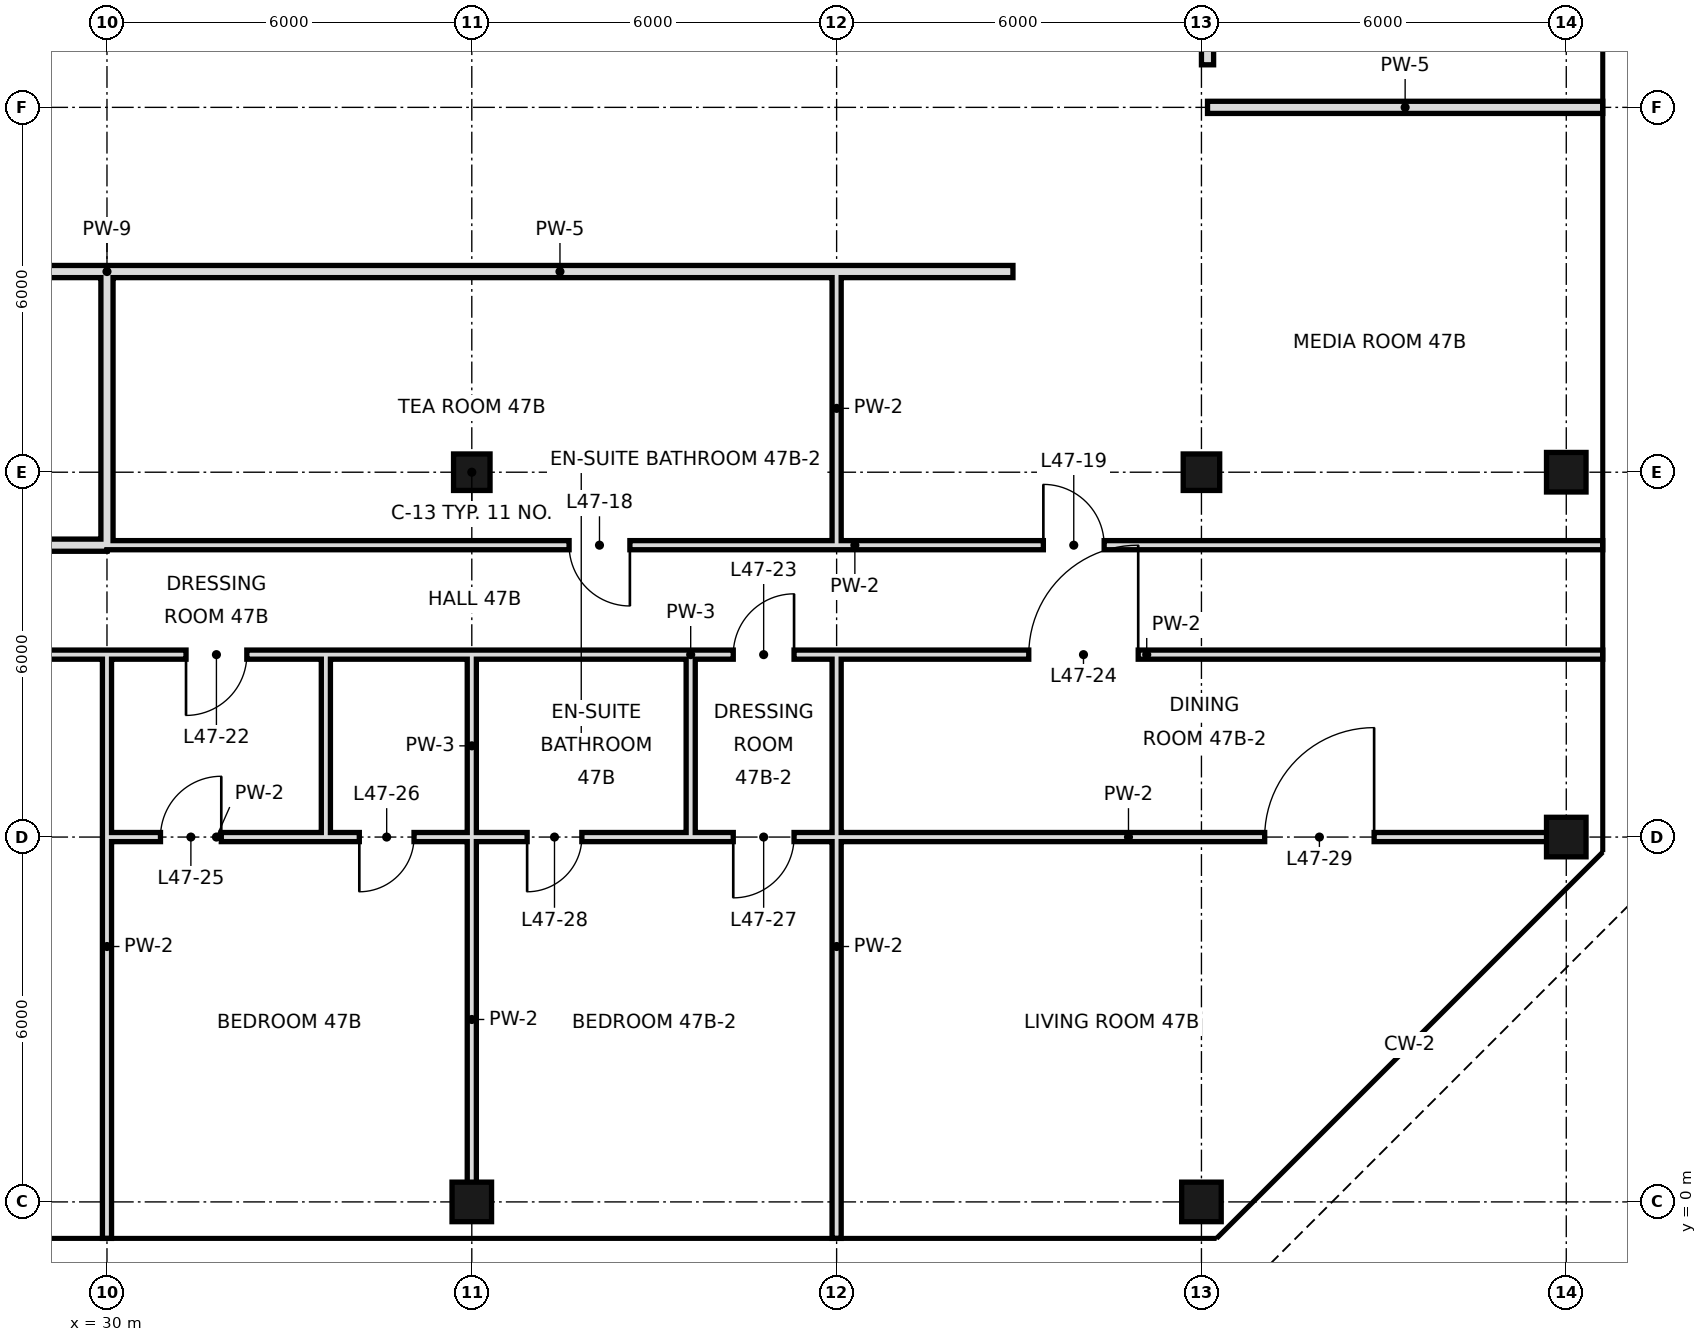
"""IFC4 building model, lengths in metres.
Left out: names, types, materials, properties, quantities, classifications, styles, units other than length and angle.
Written with IfcOpenShell. Run it as: python <this file> out.ifc"""

import sys

from ifc_helpers import new_model, si_unit, direction, frame, frame_2d, origin, origin_2d, place, context, subcontext, project, spatial, rectangle, hollow_rectangle, extrude, element, fill, save


model = new_model("IFC4")
c1 = context("Model", 3, precision=1e-05, world=origin(), true_north=direction((0.0, 1.0)))
c2 = subcontext(c1, "Body", "Model", "MODEL_VIEW")
j1 = project(units=[si_unit("LENGTHUNIT", "METRE"), si_unit("PLANEANGLEUNIT", "RADIAN")], contexts=[c1])
p1 = place(None, origin())
s1 = spatial("IfcSite", under=j1, at=p1, CompositionType="ELEMENT")
p2 = place(p1, origin())
s2 = spatial("IfcBuilding", under=s1, at=p2, CompositionType="ELEMENT")
p3 = place(p2, frame((0.0, 0.0, 202.8)))
s3 = spatial("IfcBuildingStorey", under=s2, at=p3, CompositionType="ELEMENT", Elevation=202.8)
p4 = place(p3, frame((36.0, 0.0, 0.0), z_axis=(0.0, 0.0, 1.0), x_axis=(1.0, 0.0, 0.0)))
e1 = element("IfcColumn", 1, at=p4, inside=s3, PredefinedType="COLUMN", context=c2, shape_type="SweptSolid", body=[
    extrude(hollow_rectangle(XDim=0.65, YDim=0.65, WallThickness=0.032, at=origin_2d()), origin(), (0.0, 0.0, 1.0), 3.6),
])
p5 = place(p3, frame((36.0, 12.0, 0.0), z_axis=(0.0, 0.0, 1.0), x_axis=(1.0, 0.0, 0.0)))
e2 = element("IfcColumn", 2, at=p5, inside=s3, PredefinedType="COLUMN", context=c2, shape_type="SweptSolid", body=[
    extrude(hollow_rectangle(XDim=0.6, YDim=0.6, WallThickness=0.028, at=origin_2d()), origin(), (0.0, 0.0, 1.0), 3.6),
])
p6 = place(p3, frame((48.0, 0.0, 0.0), z_axis=(0.0, 0.0, 1.0), x_axis=(1.0, 0.0, 0.0)))
e3 = element("IfcColumn", 3, at=p6, inside=s3, PredefinedType="COLUMN", context=c2, shape_type="SweptSolid", body=[
    extrude(hollow_rectangle(XDim=0.65, YDim=0.65, WallThickness=0.032, at=origin_2d()), origin(), (0.0, 0.0, 1.0), 3.6),
])
p7 = place(p3, frame((48.0, 12.0, 0.0), z_axis=(0.0, 0.0, 1.0), x_axis=(1.0, 0.0, 0.0)))
e4 = element("IfcColumn", 4, at=p7, inside=s3, PredefinedType="COLUMN", context=c2, shape_type="SweptSolid", body=[
    extrude(hollow_rectangle(XDim=0.6, YDim=0.6, WallThickness=0.028, at=origin_2d()), origin(), (0.0, 0.0, 1.0), 3.6),
])
for number, where, z_axis, x_axis in (
    (5, (54.0, 6.0, 0.0), (0.0, 0.0, 1.0), (1.0, 0.0, 0.0)),
    (6, (54.0, 12.0, 0.0), (0.0, 0.0, 1.0), (1.0, 0.0, 0.0)),
):
    element("IfcColumn", number, at=place(p3, frame(where, z_axis=z_axis, x_axis=x_axis)), inside=s3, PredefinedType="COLUMN", context=c2, shape_type="SweptSolid", body=[
        extrude(hollow_rectangle(XDim=0.65, YDim=0.65, WallThickness=0.032, at=origin_2d()), origin(), (0.0, 0.0, 1.0), 3.6),
    ])
p8 = place(p3, frame((30.0, 10.8, 0.0), z_axis=(0.0, 0.0, 1.0), x_axis=(0.0, 1.0, 0.0)))
e7 = element("IfcWall", 7, at=p8, inside=s3, PredefinedType="SOLIDWALL", context=c2, shape_type="SweptSolid", body=[
    extrude(rectangle(XDim=4.5, YDim=0.2, at=frame_2d((2.25, 0.0))), origin(), (0.0, 0.0, 1.0), 2.72),
])
p9 = place(p3, frame((30.0, -0.6, 0.0), z_axis=(0.0, 0.0, 1.0), x_axis=(0.0, 1.0, 0.0)))
e8 = element("IfcWall", 8, at=p9, inside=s3, PredefinedType="PARTITIONING", context=c2, shape_type="SweptSolid", body=[
    extrude(rectangle(XDim=9.6, YDim=0.15, at=frame_2d((4.8, 0.0))), origin(), (0.0, 0.0, 1.0), 2.72),
])
p10 = place(p3, frame((33.6, 6.0, 0.0), z_axis=(0.0, 0.0, 1.0), x_axis=(0.0, 1.0, 0.0)))
e9 = element("IfcWall", 9, at=p10, inside=s3, PredefinedType="PARTITIONING", context=c2, shape_type="SweptSolid", body=[
    extrude(rectangle(XDim=3.0, YDim=0.15, at=frame_2d((1.5, 0.0))), origin(), (0.0, 0.0, 1.0), 3.42),
])
p11 = place(p3, frame((36.0, 0.0, 0.0), z_axis=(0.0, 0.0, 1.0), x_axis=(0.0, 1.0, 0.0)))
e10 = element("IfcWall", 10, at=p11, inside=s3, PredefinedType="PARTITIONING", context=c2, shape_type="SweptSolid", body=[
    extrude(rectangle(XDim=6.0, YDim=0.15, at=frame_2d((3.0, 0.0))), origin(), (0.0, 0.0, 1.0), 2.72),
])
p12 = place(p3, frame((36.0, 6.0, 0.0), z_axis=(0.0, 0.0, 1.0), x_axis=(0.0, 1.0, 0.0)))
e11 = element("IfcWall", 11, at=p12, inside=s3, PredefinedType="PARTITIONING", context=c2, shape_type="SweptSolid", body=[
    extrude(rectangle(XDim=3.0, YDim=0.15, at=frame_2d((1.5, 0.0))), origin(), (0.0, 0.0, 1.0), 2.72),
])
p13 = place(p3, frame((39.6, 6.0, 0.0), z_axis=(0.0, 0.0, 1.0), x_axis=(0.0, 1.0, 0.0)))
e12 = element("IfcWall", 12, at=p13, inside=s3, PredefinedType="PARTITIONING", context=c2, shape_type="SweptSolid", body=[
    extrude(rectangle(XDim=3.0, YDim=0.15, at=frame_2d((1.5, 0.0))), origin(), (0.0, 0.0, 1.0), 3.42),
])
p14 = place(p3, frame((42.0, -0.6, 0.0), z_axis=(0.0, 0.0, 1.0), x_axis=(0.0, 1.0, 0.0)))
e13 = element("IfcWall", 13, at=p14, inside=s3, PredefinedType="PARTITIONING", context=c2, shape_type="SweptSolid", body=[
    extrude(rectangle(XDim=9.6, YDim=0.15, at=frame_2d((4.8, 0.0))), origin(), (0.0, 0.0, 1.0), 2.72),
])
p15 = place(p3, frame((42.0, 10.8, 0.0), z_axis=(0.0, 0.0, 1.0), x_axis=(0.0, 1.0, 0.0)))
e14 = element("IfcWall", 14, at=p15, inside=s3, PredefinedType="PARTITIONING", context=c2, shape_type="SweptSolid", body=[
    extrude(rectangle(XDim=4.5, YDim=0.15, at=frame_2d((2.25, 0.0))), origin(), (0.0, 0.0, 1.0), 2.72),
])
p16 = place(p3, frame((48.1, 18.7, 0.0), z_axis=(0.0, 0.0, 1.0), x_axis=(0.0, 1.0, 0.0)))
e15 = element("IfcWall", 15, at=p16, inside=s3, PredefinedType="SOLIDWALL", context=c2, shape_type="SweptSolid", body=[
    extrude(rectangle(XDim=29.2, YDim=0.2, at=frame_2d((14.6, 0.0))), origin(), (0.0, 0.0, 1.0), 2.72),
])
p17 = place(p16, frame((14.0, 0.0, 0.0)))
e16 = element("IfcOpeningElement", 16, at=p17, cuts=e15, PredefinedType="OPENING", context=c2, shape_type="SweptSolid", body=[
    extrude(rectangle(XDim=1.2, YDim=2.4, at=frame_2d((0.6, 1.2))), frame((0.0, 0.11, 0.0), z_axis=(0.0, -1.0, 0.0), x_axis=(1.0, 0.0, 0.0)), (0.0, 0.0, 1.0), 0.22),
])
p18 = place(p3, frame((24.0, 10.8, 0.0), z_axis=(0.0, 0.0, 1.0), x_axis=(1.0, 0.0, 0.0)))
e17 = element("IfcWall", 17, at=p18, inside=s3, PredefinedType="SOLIDWALL", context=c2, shape_type="SweptSolid", body=[
    extrude(rectangle(XDim=6.0, YDim=0.2, at=frame_2d((3.0, 0.0))), origin(), (0.0, 0.0, 1.0), 2.72),
])
p19 = place(p18, frame((1.6, 0.0, 0.0)))
e18 = element("IfcOpeningElement", 18, at=p19, cuts=e17, PredefinedType="OPENING", context=c2, shape_type="SweptSolid", body=[
    extrude(rectangle(XDim=1.0, YDim=2.4, at=frame_2d((0.5, 1.2))), frame((0.0, 0.11, 0.0), z_axis=(0.0, -1.0, 0.0), x_axis=(1.0, 0.0, 0.0)), (0.0, 0.0, 1.0), 0.22),
])
p20 = place(p3, frame((30.0, 10.8, 0.0), z_axis=(0.0, 0.0, 1.0), x_axis=(1.0, 0.0, 0.0)))
e19 = element("IfcWall", 19, at=p20, inside=s3, PredefinedType="PARTITIONING", context=c2, shape_type="SweptSolid", body=[
    extrude(rectangle(XDim=24.6, YDim=0.15, at=frame_2d((12.3, 0.0))), origin(), (0.0, 0.0, 1.0), 3.42),
])
p21 = place(p20, frame((7.6, 0.0, 0.0)))
e20 = element("IfcOpeningElement", 20, at=p21, cuts=e19, PredefinedType="OPENING", context=c2, shape_type="SweptSolid", body=[
    extrude(rectangle(XDim=1.0, YDim=2.4, at=frame_2d((0.5, 1.2))), frame((0.0, 0.085, 0.0), z_axis=(0.0, -1.0, 0.0), x_axis=(1.0, 0.0, 0.0)), (0.0, 0.0, 1.0), 0.17),
])
p22 = place(p20, frame((15.4, 0.0, 0.0)))
e21 = element("IfcOpeningElement", 21, at=p22, cuts=e19, PredefinedType="OPENING", context=c2, shape_type="SweptSolid", body=[
    extrude(rectangle(XDim=1.0, YDim=2.4, at=frame_2d((0.5, 1.2))), frame((0.0, 0.085, 0.0), z_axis=(0.0, -1.0, 0.0), x_axis=(1.0, 0.0, 0.0)), (0.0, 0.0, 1.0), 0.17),
])
p23 = place(p3, frame((30.0, 15.3, 0.0), z_axis=(0.0, 0.0, 1.0), x_axis=(1.0, 0.0, 0.0)))
e22 = element("IfcWall", 22, at=p23, inside=s3, PredefinedType="SOLIDWALL", context=c2, shape_type="SweptSolid", body=[
    extrude(rectangle(XDim=14.9, YDim=0.2, at=frame_2d((7.45, 0.0))), origin(), (0.0, 0.0, 1.0), 2.72),
])
p24 = place(p3, frame((24.0, 15.3, 0.0), z_axis=(0.0, 0.0, 1.0), x_axis=(1.0, 0.0, 0.0)))
e23 = element("IfcWall", 23, at=p24, inside=s3, PredefinedType="SOLIDWALL", context=c2, shape_type="SweptSolid", body=[
    extrude(rectangle(XDim=6.0, YDim=0.2, at=frame_2d((3.0, 0.0))), origin(), (0.0, 0.0, 1.0), 2.72),
])
p25 = place(p3, frame((48.1, 18.0, 0.0), z_axis=(0.0, 0.0, 1.0), x_axis=(1.0, 0.0, 0.0)))
e24 = element("IfcWall", 24, at=p25, inside=s3, PredefinedType="SOLIDWALL", context=c2, shape_type="SweptSolid", body=[
    extrude(rectangle(XDim=6.5, YDim=0.2, at=frame_2d((3.25, 0.0))), origin(), (0.0, 0.0, 1.0), 2.72),
])
p26 = place(p3, frame((30.0, 6.0, 0.0), z_axis=(0.0, 0.0, 1.0), x_axis=(1.0, 0.0, 0.0)))
e25 = element("IfcWall", 25, at=p26, inside=s3, PredefinedType="PARTITIONING", context=c2, shape_type="SweptSolid", body=[
    extrude(rectangle(XDim=3.6, YDim=0.15, at=frame_2d((1.8, 0.0))), origin(), (0.0, 0.0, 1.0), 2.97),
])
p27 = place(p26, frame((0.88, 0.0, 0.0)))
e26 = element("IfcOpeningElement", 26, at=p27, cuts=e25, PredefinedType="OPENING", context=c2, shape_type="SweptSolid", body=[
    extrude(rectangle(XDim=1.0, YDim=2.4, at=frame_2d((0.5, 1.2))), frame((0.0, 0.085, 0.0), z_axis=(0.0, -1.0, 0.0), x_axis=(1.0, 0.0, 0.0)), (0.0, 0.0, 1.0), 0.17),
])
p28 = place(p3, frame((39.6, 6.0, 0.0), z_axis=(0.0, 0.0, 1.0), x_axis=(1.0, 0.0, 0.0)))
e27 = element("IfcWall", 27, at=p28, inside=s3, PredefinedType="PARTITIONING", context=c2, shape_type="SweptSolid", body=[
    extrude(rectangle(XDim=14.4, YDim=0.15, at=frame_2d((7.2, 0.0))), origin(), (0.0, 0.0, 1.0), 2.97),
])
p29 = place(p28, frame((0.7, 0.0, 0.0)))
e28 = element("IfcOpeningElement", 28, at=p29, cuts=e27, PredefinedType="OPENING", context=c2, shape_type="SweptSolid", body=[
    extrude(rectangle(XDim=1.0, YDim=2.4, at=frame_2d((0.5, 1.2))), frame((0.0, 0.085, 0.0), z_axis=(0.0, -1.0, 0.0), x_axis=(1.0, 0.0, 0.0)), (0.0, 0.0, 1.0), 0.17),
])
p30 = place(p28, frame((9.44, 0.0, 0.0)))
e29 = element("IfcOpeningElement", 29, at=p30, cuts=e27, PredefinedType="OPENING", context=c2, shape_type="SweptSolid", body=[
    extrude(rectangle(XDim=1.8, YDim=2.4, at=frame_2d((0.9, 1.2))), frame((0.0, 0.085, 0.0), z_axis=(0.0, -1.0, 0.0), x_axis=(1.0, 0.0, 0.0)), (0.0, 0.0, 1.0), 0.17),
])
p31 = place(p3, frame((33.6, 6.0, 0.0), z_axis=(0.0, 0.0, 1.0), x_axis=(1.0, 0.0, 0.0)))
e30 = element("IfcWall", 30, at=p31, inside=s3, PredefinedType="PARTITIONING", context=c2, shape_type="SweptSolid", body=[
    extrude(rectangle(XDim=6.0, YDim=0.15, at=frame_2d((3.0, 0.0))), origin(), (0.0, 0.0, 1.0), 2.97),
])
p32 = place(p31, frame((0.55, 0.0, 0.0)))
e31 = element("IfcOpeningElement", 31, at=p32, cuts=e30, PredefinedType="OPENING", context=c2, shape_type="SweptSolid", body=[
    extrude(rectangle(XDim=0.9, YDim=2.4, at=frame_2d((0.45, 1.2))), frame((0.0, 0.085, 0.0), z_axis=(0.0, -1.0, 0.0), x_axis=(1.0, 0.0, 0.0)), (0.0, 0.0, 1.0), 0.17),
])
p33 = place(p31, frame((3.31, 0.0, 0.0)))
e32 = element("IfcOpeningElement", 32, at=p33, cuts=e30, PredefinedType="OPENING", context=c2, shape_type="SweptSolid", body=[
    extrude(rectangle(XDim=0.9, YDim=2.4, at=frame_2d((0.45, 1.2))), frame((0.0, 0.085, 0.0), z_axis=(0.0, -1.0, 0.0), x_axis=(1.0, 0.0, 0.0)), (0.0, 0.0, 1.0), 0.17),
])
p34 = place(p3, frame((18.0, 9.0, 0.0), z_axis=(0.0, 0.0, 1.0), x_axis=(1.0, 0.0, 0.0)))
e33 = element("IfcWall", 33, at=p34, inside=s3, PredefinedType="PARTITIONING", context=c2, shape_type="SweptSolid", body=[
    extrude(rectangle(XDim=15.6, YDim=0.15, at=frame_2d((7.8, 0.0))), origin(), (0.0, 0.0, 1.0), 3.42),
])
p35 = place(p34, frame((2.5, 0.0, 0.0)))
e34 = element("IfcOpeningElement", 34, at=p35, cuts=e33, PredefinedType="OPENING", context=c2, shape_type="SweptSolid", body=[
    extrude(rectangle(XDim=1.0, YDim=2.4, at=frame_2d((0.5, 1.2))), frame((0.0, 0.085, 0.0), z_axis=(0.0, -1.0, 0.0), x_axis=(1.0, 0.0, 0.0)), (0.0, 0.0, 1.0), 0.17),
])
p36 = place(p34, frame((8.84, 0.0, 0.0)))
e35 = element("IfcOpeningElement", 35, at=p36, cuts=e33, PredefinedType="OPENING", context=c2, shape_type="SweptSolid", body=[
    extrude(rectangle(XDim=1.8, YDim=2.4, at=frame_2d((0.9, 1.2))), frame((0.0, 0.085, 0.0), z_axis=(0.0, -1.0, 0.0), x_axis=(1.0, 0.0, 0.0)), (0.0, 0.0, 1.0), 0.17),
])
p37 = place(p34, frame((13.3, 0.0, 0.0)))
e36 = element("IfcOpeningElement", 36, at=p37, cuts=e33, PredefinedType="OPENING", context=c2, shape_type="SweptSolid", body=[
    extrude(rectangle(XDim=1.0, YDim=2.4, at=frame_2d((0.5, 1.2))), frame((0.0, 0.085, 0.0), z_axis=(0.0, -1.0, 0.0), x_axis=(1.0, 0.0, 0.0)), (0.0, 0.0, 1.0), 0.17),
])
p38 = place(p3, frame((39.6, 9.0, 0.0), z_axis=(0.0, 0.0, 1.0), x_axis=(1.0, 0.0, 0.0)))
e37 = element("IfcWall", 37, at=p38, inside=s3, PredefinedType="PARTITIONING", context=c2, shape_type="SweptSolid", body=[
    extrude(rectangle(XDim=15.0, YDim=0.15, at=frame_2d((7.5, 0.0))), origin(), (0.0, 0.0, 1.0), 3.42),
])
p39 = place(p38, frame((0.7, 0.0, 0.0)))
e38 = element("IfcOpeningElement", 38, at=p39, cuts=e37, PredefinedType="OPENING", context=c2, shape_type="SweptSolid", body=[
    extrude(rectangle(XDim=1.0, YDim=2.4, at=frame_2d((0.5, 1.2))), frame((0.0, 0.085, 0.0), z_axis=(0.0, -1.0, 0.0), x_axis=(1.0, 0.0, 0.0)), (0.0, 0.0, 1.0), 0.17),
])
p40 = place(p38, frame((5.56, 0.0, 0.0)))
e39 = element("IfcOpeningElement", 39, at=p40, cuts=e37, PredefinedType="OPENING", context=c2, shape_type="SweptSolid", body=[
    extrude(rectangle(XDim=1.8, YDim=2.4, at=frame_2d((0.9, 1.2))), frame((0.0, 0.085, 0.0), z_axis=(0.0, -1.0, 0.0), x_axis=(1.0, 0.0, 0.0)), (0.0, 0.0, 1.0), 0.17),
])
p41 = place(p3, frame((33.6, 9.0, 0.0), z_axis=(0.0, 0.0, 1.0), x_axis=(1.0, 0.0, 0.0)))
e40 = element("IfcWall", 40, at=p41, inside=s3, PredefinedType="PARTITIONING", context=c2, shape_type="SweptSolid", body=[
    extrude(rectangle(XDim=6.0, YDim=0.15, at=frame_2d((3.0, 0.0))), origin(), (0.0, 0.0, 1.0), 3.42),
])
p42 = place(p21, origin())
e41 = element("IfcDoor", 41, at=p42, inside=s3, OperationType="SINGLE_SWING_RIGHT", PredefinedType="DOOR", context=c2, shape_type="SweptSolid", body=[
    extrude(rectangle(XDim=1.0, YDim=2.4, at=frame_2d((0.5, 1.2))), frame((0.0, 0.025, 0.0), z_axis=(0.0, -1.0, 0.0), x_axis=(1.0, 0.0, 0.0)), (0.0, 0.0, 1.0), 0.05),
])
fill(e20, e41)
p43 = place(p22, origin())
e42 = element("IfcDoor", 42, at=p43, inside=s3, OperationType="SINGLE_SWING_LEFT", PredefinedType="DOOR", context=c2, shape_type="SweptSolid", body=[
    extrude(rectangle(XDim=1.0, YDim=2.4, at=frame_2d((0.5, 1.2))), frame((0.0, 0.025, 0.0), z_axis=(0.0, -1.0, 0.0), x_axis=(1.0, 0.0, 0.0)), (0.0, 0.0, 1.0), 0.05),
])
fill(e21, e42)
p44 = place(p37, frame((1.0, 0.0, 0.0), z_axis=(0.0, 0.0, 1.0), x_axis=(-1.0, 0.0, 0.0)))
e43 = element("IfcDoor", 43, at=p44, inside=s3, OperationType="SINGLE_SWING_RIGHT", PredefinedType="DOOR", context=c2, shape_type="SweptSolid", body=[
    extrude(rectangle(XDim=1.0, YDim=2.4, at=frame_2d((0.5, 1.2))), frame((0.0, 0.025, 0.0), z_axis=(0.0, -1.0, 0.0), x_axis=(1.0, 0.0, 0.0)), (0.0, 0.0, 1.0), 0.05),
])
fill(e36, e43)
p45 = place(p39, frame((1.0, 0.0, 0.0), z_axis=(0.0, 0.0, 1.0), x_axis=(-1.0, 0.0, 0.0)))
e44 = element("IfcDoor", 44, at=p45, inside=s3, OperationType="SINGLE_SWING_LEFT", PredefinedType="DOOR", context=c2, shape_type="SweptSolid", body=[
    extrude(rectangle(XDim=1.0, YDim=2.4, at=frame_2d((0.5, 1.2))), frame((0.0, 0.025, 0.0), z_axis=(0.0, -1.0, 0.0), x_axis=(1.0, 0.0, 0.0)), (0.0, 0.0, 1.0), 0.05),
])
fill(e38, e44)
p46 = place(p40, frame((1.8, 0.0, 0.0), z_axis=(0.0, 0.0, 1.0), x_axis=(-1.0, 0.0, 0.0)))
e45 = element("IfcDoor", 45, at=p46, inside=s3, OperationType="SINGLE_SWING_LEFT", PredefinedType="DOOR", context=c2, shape_type="SweptSolid", body=[
    extrude(rectangle(XDim=1.8, YDim=2.4, at=frame_2d((0.9, 1.2))), frame((0.0, 0.025, 0.0), z_axis=(0.0, -1.0, 0.0), x_axis=(1.0, 0.0, 0.0)), (0.0, 0.0, 1.0), 0.05),
])
fill(e39, e45)
p47 = place(p27, frame((1.0, 0.0, 0.0), z_axis=(0.0, 0.0, 1.0), x_axis=(-1.0, 0.0, 0.0)))
e46 = element("IfcDoor", 46, at=p47, inside=s3, OperationType="SINGLE_SWING_LEFT", PredefinedType="DOOR", context=c2, shape_type="SweptSolid", body=[
    extrude(rectangle(XDim=1.0, YDim=2.4, at=frame_2d((0.5, 1.2))), frame((0.0, 0.025, 0.0), z_axis=(0.0, -1.0, 0.0), x_axis=(1.0, 0.0, 0.0)), (0.0, 0.0, 1.0), 0.05),
])
fill(e26, e46)
p48 = place(p32, frame((0.9, 0.0, 0.0), z_axis=(0.0, 0.0, 1.0), x_axis=(-1.0, 0.0, 0.0)))
e47 = element("IfcDoor", 47, at=p48, inside=s3, OperationType="SINGLE_SWING_RIGHT", PredefinedType="DOOR", context=c2, shape_type="SweptSolid", body=[
    extrude(rectangle(XDim=0.9, YDim=2.4, at=frame_2d((0.45, 1.2))), frame((0.0, 0.025, 0.0), z_axis=(0.0, -1.0, 0.0), x_axis=(1.0, 0.0, 0.0)), (0.0, 0.0, 1.0), 0.05),
])
fill(e31, e47)
p49 = place(p29, frame((1.0, 0.0, 0.0), z_axis=(0.0, 0.0, 1.0), x_axis=(-1.0, 0.0, 0.0)))
e48 = element("IfcDoor", 48, at=p49, inside=s3, OperationType="SINGLE_SWING_RIGHT", PredefinedType="DOOR", context=c2, shape_type="SweptSolid", body=[
    extrude(rectangle(XDim=1.0, YDim=2.4, at=frame_2d((0.5, 1.2))), frame((0.0, 0.025, 0.0), z_axis=(0.0, -1.0, 0.0), x_axis=(1.0, 0.0, 0.0)), (0.0, 0.0, 1.0), 0.05),
])
fill(e28, e48)
p50 = place(p33, frame((0.9, 0.0, 0.0), z_axis=(0.0, 0.0, 1.0), x_axis=(-1.0, 0.0, 0.0)))
e49 = element("IfcDoor", 49, at=p50, inside=s3, OperationType="SINGLE_SWING_RIGHT", PredefinedType="DOOR", context=c2, shape_type="SweptSolid", body=[
    extrude(rectangle(XDim=0.9, YDim=2.4, at=frame_2d((0.45, 1.2))), frame((0.0, 0.025, 0.0), z_axis=(0.0, -1.0, 0.0), x_axis=(1.0, 0.0, 0.0)), (0.0, 0.0, 1.0), 0.05),
])
fill(e32, e49)
p51 = place(p30, frame((1.8, 0.0, 0.0), z_axis=(0.0, 0.0, 1.0), x_axis=(-1.0, 0.0, 0.0)))
e50 = element("IfcDoor", 50, at=p51, inside=s3, OperationType="SINGLE_SWING_LEFT", PredefinedType="DOOR", context=c2, shape_type="SweptSolid", body=[
    extrude(rectangle(XDim=1.8, YDim=2.4, at=frame_2d((0.9, 1.2))), frame((0.0, 0.025, 0.0), z_axis=(0.0, -1.0, 0.0), x_axis=(1.0, 0.0, 0.0)), (0.0, 0.0, 1.0), 0.05),
])
fill(e29, e50)
save(model, sys.argv[1])
